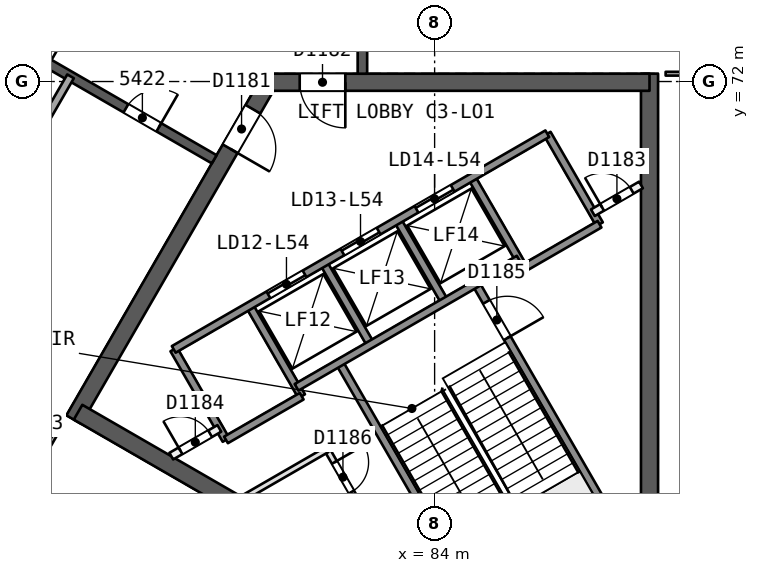
"""IFC4 building model, lengths in metres.
Left out: names, types, materials, properties, quantities, classifications, styles, units other than length and angle.
Written with IfcOpenShell. Run it as: python <this file> out.ifc"""

import sys

from ifc_helpers import new_model, si_unit, direction, frame, frame_2d, origin, place, context, subcontext, project, spatial, rectangle, extrude, element, fill, save


model = new_model("IFC4")
c1 = context("Model", 3, precision=1e-05, world=origin(), true_north=direction((0.0, 1.0)))
c2 = subcontext(c1, "Body", "Model", "MODEL_VIEW")
j1 = project(units=[si_unit("LENGTHUNIT", "METRE"), si_unit("PLANEANGLEUNIT", "RADIAN")], contexts=[c1])
p1 = place(None, origin())
s1 = spatial("IfcSite", under=j1, at=p1, CompositionType="ELEMENT")
p2 = place(p1, origin())
s2 = spatial("IfcBuilding", under=s1, at=p2, CompositionType="ELEMENT")
p3 = place(p2, frame((0.0, 0.0, 220.6)))
s3 = spatial("IfcBuildingStorey", under=s2, at=p3, CompositionType="ELEMENT", Elevation=220.6)
p4 = place(p3, frame((79.63, 71.981, 0.0), z_axis=(0.0, 0.0, 1.0), x_axis=(-0.500002171595, -0.86602415001, 0.0)))
e1 = element("IfcWall", 1, at=p4, inside=s3, PredefinedType="SHEAR", context=c2, shape_type="SweptSolid", body=[
    extrude(rectangle(XDim=10.25, YDim=0.45, at=frame_2d((5.125, 0.0))), origin(), (0.0, 0.0, 1.0), 3.7),
])
p5 = place(p4, frame((0.82, 0.0, 0.0)))
e2 = element("IfcOpeningElement", 2, at=p5, cuts=e1, PredefinedType="OPENING", context=c2, shape_type="SweptSolid", body=[
    extrude(rectangle(XDim=1.2, YDim=2.1, at=frame_2d((0.6, 1.05))), frame((0.0, 0.235, 0.0), z_axis=(0.0, -1.0, 0.0), x_axis=(1.0, 0.0, 0.0)), (0.0, 0.0, 1.0), 0.471),
])
p6 = place(p3, frame((74.617, 63.299, 0.0), z_axis=(0.0, 0.0, 1.0), x_axis=(0.86602594008, -0.499999071108, 0.0)))
e3 = element("IfcWall", 3, at=p6, inside=s3, PredefinedType="SHEAR", context=c2, shape_type="SweptSolid", body=[
    extrude(rectangle(XDim=14.108, YDim=0.45, at=frame_2d((7.054, 0.0))), origin(), (0.0, 0.0, 1.0), 3.7),
])
p7 = place(p3, frame((89.655, 58.002, 0.0), z_axis=(0.0, 0.0, 1.0), x_axis=(0.0, 1.0, 0.0)))
e4 = element("IfcWall", 4, at=p7, inside=s3, PredefinedType="SHEAR", context=c2, shape_type="SweptSolid", body=[
    extrude(rectangle(XDim=14.204, YDim=0.45, at=frame_2d((7.102, 0.0))), origin(), (0.0, 0.0, 1.0), 3.7),
])
p8 = place(p3, frame((89.655, 71.981, 0.0), z_axis=(0.0, 0.0, 1.0), x_axis=(-1.0, 0.0, 0.0)))
e5 = element("IfcWall", 5, at=p8, inside=s3, PredefinedType="SHEAR", context=c2, shape_type="SweptSolid", body=[
    extrude(rectangle(XDim=10.155, YDim=0.45, at=frame_2d((5.078, 0.0))), origin(), (0.0, 0.0, 1.0), 3.7),
])
p9 = place(p8, frame((8.005, 0.0, 0.0)))
e6 = element("IfcOpeningElement", 6, at=p9, cuts=e5, PredefinedType="OPENING", context=c2, shape_type="SweptSolid", body=[
    extrude(rectangle(XDim=1.2, YDim=2.1, at=frame_2d((0.6, 1.05))), frame((0.0, 0.235, 0.0), z_axis=(0.0, -1.0, 0.0), x_axis=(1.0, 0.0, 0.0)), (0.0, 0.0, 1.0), 0.471),
])
p10 = place(p3, frame((82.1, 72.206, 0.0), z_axis=(0.0, 0.0, 1.0), x_axis=(0.0, 1.0, 0.0)))
e7 = element("IfcWall", 7, at=p10, inside=s3, PredefinedType="SHEAR", context=c2, shape_type="SweptSolid", body=[
    extrude(rectangle(XDim=15.588, YDim=0.25, at=frame_2d((7.794, 0.0))), origin(), (0.0, 0.0, 1.0), 3.3),
])
p11 = place(p10, frame((2.15, 0.0, 0.0)))
e8 = element("IfcOpeningElement", 8, at=p11, cuts=e7, PredefinedType="OPENING", context=c2, shape_type="SweptSolid", body=[
    extrude(rectangle(XDim=1.0, YDim=2.1, at=frame_2d((0.5, 1.05))), frame((0.0, 0.135, 0.0), z_axis=(0.0, -1.0, 0.0), x_axis=(1.0, 0.0, 0.0)), (0.0, 0.0, 1.0), 0.271),
])
p12 = place(p10, frame((8.75, 0.0, 0.0)))
e9 = element("IfcOpeningElement", 9, at=p12, cuts=e7, PredefinedType="OPENING", context=c2, shape_type="SweptSolid", body=[
    extrude(rectangle(XDim=1.0, YDim=2.1, at=frame_2d((0.5, 1.05))), frame((0.0, 0.135, 0.0), z_axis=(0.0, -1.0, 0.0), x_axis=(1.0, 0.0, 0.0)), (0.0, 0.0, 1.0), 0.271),
])
p13 = place(p10, frame((12.594, 0.0, 0.0)))
e10 = element("IfcOpeningElement", 10, at=p13, cuts=e7, PredefinedType="OPENING", context=c2, shape_type="SweptSolid", body=[
    extrude(rectangle(XDim=1.0, YDim=2.1, at=frame_2d((0.5, 1.05))), frame((0.0, 0.135, 0.0), z_axis=(0.0, -1.0, 0.0), x_axis=(1.0, 0.0, 0.0)), (0.0, 0.0, 1.0), 0.271),
])
p14 = place(p3, frame((64.7, 77.748, 0.0), z_axis=(0.0, 0.0, 1.0), x_axis=(0.866026492143, -0.499998114903, 0.0)))
e11 = element("IfcWall", 11, at=p14, inside=s3, PredefinedType="SHEAR", context=c2, shape_type="SweptSolid", body=[
    extrude(rectangle(XDim=15.588, YDim=0.25, at=frame_2d((7.794, 0.0))), origin(), (0.0, 0.0, 1.0), 3.3),
])
p15 = place(p14, frame((2.462, 0.0, 0.0)))
e12 = element("IfcOpeningElement", 12, at=p15, cuts=e11, PredefinedType="OPENING", context=c2, shape_type="SweptSolid", body=[
    extrude(rectangle(XDim=1.0, YDim=2.1, at=frame_2d((0.5, 1.05))), frame((0.0, 0.135, 0.0), z_axis=(0.0, -1.0, 0.0), x_axis=(1.0, 0.0, 0.0)), (0.0, 0.0, 1.0), 0.271),
])
p16 = place(p14, frame((9.474, 0.0, 0.0)))
e13 = element("IfcOpeningElement", 13, at=p16, cuts=e11, PredefinedType="OPENING", context=c2, shape_type="SweptSolid", body=[
    extrude(rectangle(XDim=1.1, YDim=2.1, at=frame_2d((0.55, 1.05))), frame((0.0, 0.135, 0.0), z_axis=(0.0, -1.0, 0.0), x_axis=(1.0, 0.0, 0.0)), (0.0, 0.0, 1.0), 0.271),
])
p17 = place(p14, frame((12.906, 0.0, 0.0)))
e14 = element("IfcOpeningElement", 14, at=p17, cuts=e11, PredefinedType="OPENING", context=c2, shape_type="SweptSolid", body=[
    extrude(rectangle(XDim=1.0, YDim=2.1, at=frame_2d((0.5, 1.05))), frame((0.0, 0.135, 0.0), z_axis=(0.0, -1.0, 0.0), x_axis=(1.0, 0.0, 0.0)), (0.0, 0.0, 1.0), 0.271),
])
p18 = place(p3, frame((90.079, 72.206, 0.0), z_axis=(0.0, 0.0, 1.0), x_axis=(1.0, 0.0, 0.0)))
e15 = element("IfcWall", 15, at=p18, inside=s3, PredefinedType="PARTITIONING", context=c2, shape_type="SweptSolid", body=[
    extrude(rectangle(XDim=2.424, YDim=0.1, at=frame_2d((1.212, 0.0))), origin(), (0.0, 0.0, 1.0), 3.3),
])
p19 = place(p18, frame((0.762, 0.0, 0.0)))
e16 = element("IfcOpeningElement", 16, at=p19, cuts=e15, PredefinedType="OPENING", context=c2, shape_type="SweptSolid", body=[
    extrude(rectangle(XDim=0.9, YDim=2.1, at=frame_2d((0.45, 1.05))), frame((0.0, 0.061, 0.0), z_axis=(0.0, -1.0, 0.0), x_axis=(1.0, 0.0, 0.0)), (0.0, 0.0, 1.0), 0.121),
])
p20 = place(p3, frame((69.219, 63.127, 0.0), z_axis=(0.0, 0.0, 1.0), x_axis=(0.499993317952, 0.866029261632, 0.0)))
e17 = element("IfcWall", 17, at=p20, inside=s3, PredefinedType="PARTITIONING", context=c2, shape_type="SweptSolid", body=[
    extrude(rectangle(XDim=10.403, YDim=0.2, at=frame_2d((5.202, 0.0))), origin(), (0.0, 0.0, 1.0), 3.3),
])
p21 = place(p3, frame((72.999, 60.945, 0.0), z_axis=(0.0, 0.0, 1.0), x_axis=(0.49995203611, 0.866053093978, 0.0)))
e18 = element("IfcWall", 18, at=p21, inside=s3, PredefinedType="PARTITIONING", context=c2, shape_type="SweptSolid", body=[
    extrude(rectangle(XDim=2.424, YDim=0.1, at=frame_2d((1.212, 0.0))), origin(), (0.0, 0.0, 1.0), 3.3),
])
p22 = place(p21, frame((0.762, 0.0, 0.0)))
e19 = element("IfcOpeningElement", 19, at=p22, cuts=e18, PredefinedType="OPENING", context=c2, shape_type="SweptSolid", body=[
    extrude(rectangle(XDim=0.9, YDim=2.1, at=frame_2d((0.45, 1.05))), frame((0.0, 0.061, 0.0), z_axis=(0.0, -1.0, 0.0), x_axis=(1.0, 0.0, 0.0)), (0.0, 0.0, 1.0), 0.121),
])
p23 = place(p3, frame((88.155, 52.022, 0.0), z_axis=(0.0, 0.0, 1.0), x_axis=(-0.866024521231, 0.500001528624, 0.0)))
e20 = element("IfcWall", 20, at=p23, inside=s3, PredefinedType="SOLIDWALL", context=c2, shape_type="SweptSolid", body=[
    extrude(rectangle(XDim=50.762, YDim=0.3, at=frame_2d((25.381, 0.0))), origin(), (0.0, 0.0, 1.0), 3.3),
])
p24 = place(p23, frame((23.402, 0.0, 0.0)))
e21 = element("IfcOpeningElement", 21, at=p24, cuts=e20, PredefinedType="OPENING", context=c2, shape_type="SweptSolid", body=[
    extrude(rectangle(XDim=2.4, YDim=2.4, at=frame_2d((1.2, 1.2))), frame((0.0, 0.161, 0.0), z_axis=(0.0, -1.0, 0.0), x_axis=(1.0, 0.0, 0.0)), (0.0, 0.0, 1.0), 0.321),
])
p25 = place(p23, frame((29.013, 0.0, 0.0)))
e22 = element("IfcOpeningElement", 22, at=p25, cuts=e20, PredefinedType="OPENING", context=c2, shape_type="SweptSolid", body=[
    extrude(rectangle(XDim=2.4, YDim=2.4, at=frame_2d((1.2, 1.2))), frame((0.0, 0.161, 0.0), z_axis=(0.0, -1.0, 0.0), x_axis=(1.0, 0.0, 0.0)), (0.0, 0.0, 1.0), 0.321),
])
p26 = place(p23, frame((39.492, 0.0, 0.0)))
e23 = element("IfcOpeningElement", 23, at=p26, cuts=e20, PredefinedType="OPENING", context=c2, shape_type="SweptSolid", body=[
    extrude(rectangle(XDim=2.4, YDim=2.4, at=frame_2d((1.2, 1.2))), frame((0.0, 0.161, 0.0), z_axis=(0.0, -1.0, 0.0), x_axis=(1.0, 0.0, 0.0)), (0.0, 0.0, 1.0), 0.321),
])
p27 = place(p23, frame((18.569, 0.0, 0.0)))
e24 = element("IfcOpeningElement", 24, at=p27, cuts=e20, PredefinedType="OPENING", context=c2, shape_type="SweptSolid", body=[
    extrude(rectangle(XDim=2.4, YDim=2.4, at=frame_2d((1.2, 1.2))), frame((0.0, 0.161, 0.0), z_axis=(0.0, -1.0, 0.0), x_axis=(1.0, 0.0, 0.0)), (0.0, 0.0, 1.0), 0.321),
])
p28 = place(p23, frame((8.878, 0.0, 0.0)))
e25 = element("IfcOpeningElement", 25, at=p28, cuts=e20, PredefinedType="OPENING", context=c2, shape_type="SweptSolid", body=[
    extrude(rectangle(XDim=2.4, YDim=2.4, at=frame_2d((1.2, 1.2))), frame((0.0, 0.161, 0.0), z_axis=(0.0, -1.0, 0.0), x_axis=(1.0, 0.0, 0.0)), (0.0, 0.0, 1.0), 0.321),
])
p29 = place(p3, frame((77.135, 64.952, 0.0), z_axis=(0.0, 0.0, 1.0), x_axis=(0.499996545922, -0.866027397988, 0.0)))
e26 = element("IfcWall", 26, at=p29, inside=s3, PredefinedType="SOLIDWALL", context=c2, shape_type="SweptSolid", body=[
    extrude(rectangle(XDim=2.75, YDim=0.2, at=frame_2d((1.375, 0.0))), origin(), (0.0, 0.0, 1.0), 3.3),
])
p30 = place(p3, frame((81.169, 62.315, 0.0), z_axis=(0.0, 0.0, 1.0), x_axis=(0.499995408039, -0.866028054938, 0.0)))
e27 = element("IfcWall", 27, at=p30, inside=s3, PredefinedType="PARTITIONING", context=c2, shape_type="SweptSolid", body=[
    extrude(rectangle(XDim=1.6, YDim=0.15, at=frame_2d((0.8, 0.0))), origin(), (0.0, 0.0, 1.0), 3.3),
])
p31 = place(p30, frame((0.387, 0.0, 0.0)))
e28 = element("IfcOpeningElement", 28, at=p31, cuts=e27, PredefinedType="OPENING", context=c2, shape_type="SweptSolid", body=[
    extrude(rectangle(XDim=0.9, YDim=2.1, at=frame_2d((0.45, 1.05))), frame((0.0, 0.085, 0.0), z_axis=(0.0, -1.0, 0.0), x_axis=(1.0, 0.0, 0.0)), (0.0, 0.0, 1.0), 0.171),
])
p32 = place(p3, frame((79.127, 66.102, 0.0), z_axis=(0.0, 0.0, 1.0), x_axis=(0.499996545922, -0.866027397988, 0.0)))
e29 = element("IfcWall", 29, at=p32, inside=s3, PredefinedType="SOLIDWALL", context=c2, shape_type="SweptSolid", body=[
    extrude(rectangle(XDim=2.75, YDim=0.2, at=frame_2d((1.375, 0.0))), origin(), (0.0, 0.0, 1.0), 3.3),
])
p33 = place(p3, frame((81.493, 64.604, 0.0), z_axis=(0.0, 0.0, 1.0), x_axis=(0.500006057782, -0.866021906294, 0.0)))
e30 = element("IfcWall", 30, at=p33, inside=s3, PredefinedType="SOLIDWALL", context=c2, shape_type="SweptSolid", body=[
    extrude(rectangle(XDim=7.7, YDim=0.2, at=frame_2d((3.85, 0.0))), origin(), (0.0, 0.0, 1.0), 3.3),
])
for number, where, z_axis, x_axis in (
    (31, (81.076, 67.227, 0.0), (0.0, 0.0, 1.0), (0.5, -0.866, 0.0)),
    (32, (83.024, 68.352, 0.0), (0.0, 0.0, 1.0), (0.5, -0.866, 0.0)),
):
    element("IfcWall", number, at=place(p3, frame(where, z_axis=z_axis, x_axis=x_axis)), inside=s3, PredefinedType="SOLIDWALL", context=c2, shape_type="SweptSolid", body=[
        extrude(rectangle(XDim=2.48, YDim=0.2, at=frame_2d((1.24, 0.0))), origin(), (0.0, 0.0, 1.0), 3.3),
    ])
p34 = place(p3, frame((85.087, 66.679, 0.0), z_axis=(0.0, 0.0, 1.0), x_axis=(0.500019787375, -0.866013979237, 0.0)))
e33 = element("IfcWall", 33, at=p34, inside=s3, PredefinedType="SOLIDWALL", context=c2, shape_type="SweptSolid", body=[
    extrude(rectangle(XDim=7.7, YDim=0.2, at=frame_2d((3.85, 0.0))), origin(), (0.0, 0.0, 1.0), 3.3),
])
p35 = place(p34, frame((0.55, 0.0, 0.0)))
e34 = element("IfcOpeningElement", 34, at=p35, cuts=e33, PredefinedType="OPENING", context=c2, shape_type="SweptSolid", body=[
    extrude(rectangle(XDim=1.1, YDim=2.1, at=frame_2d((0.55, 1.05))), frame((0.0, 0.11, 0.0), z_axis=(0.0, -1.0, 0.0), x_axis=(1.0, 0.0, 0.0)), (0.0, 0.0, 1.0), 0.221),
])
for number, where, z_axis, x_axis in (
    (35, (84.973, 69.477, 0.0), (0.0, 0.0, 1.0), (0.5, -0.866, 0.0)),
    (36, (86.965, 70.626, 0.0), (0.0, 0.0, 1.0), (0.5, -0.866, 0.0)),
):
    element("IfcWall", number, at=place(p3, frame(where, z_axis=z_axis, x_axis=x_axis)), inside=s3, PredefinedType="SOLIDWALL", context=c2, shape_type="SweptSolid", body=[
        extrude(rectangle(XDim=2.75, YDim=0.2, at=frame_2d((1.375, 0.0))), origin(), (0.0, 0.0, 1.0), 3.3),
    ])
p36 = place(p3, frame((77.135, 64.952, 0.0), z_axis=(0.0, 0.0, 1.0), x_axis=(0.866031916153, 0.499988720078, 0.0)))
e37 = element("IfcWall", 37, at=p36, inside=s3, PredefinedType="SOLIDWALL", context=c2, shape_type="SweptSolid", body=[
    extrude(rectangle(XDim=11.35, YDim=0.2, at=frame_2d((5.675, 0.0))), origin(), (0.0, 0.0, 1.0), 3.3),
])
p37 = place(p36, frame((2.875, 0.0, 0.0)))
e38 = element("IfcOpeningElement", 38, at=p37, cuts=e37, PredefinedType="OPENING", context=c2, shape_type="SweptSolid", body=[
    extrude(rectangle(XDim=1.1, YDim=2.1, at=frame_2d((0.55, 1.05))), frame((0.0, 0.11, 0.0), z_axis=(0.0, -1.0, 0.0), x_axis=(1.0, 0.0, 0.0)), (0.0, 0.0, 1.0), 0.221),
])
p38 = place(p36, frame((5.125, 0.0, 0.0)))
e39 = element("IfcOpeningElement", 39, at=p38, cuts=e37, PredefinedType="OPENING", context=c2, shape_type="SweptSolid", body=[
    extrude(rectangle(XDim=1.1, YDim=2.1, at=frame_2d((0.55, 1.05))), frame((0.0, 0.11, 0.0), z_axis=(0.0, -1.0, 0.0), x_axis=(1.0, 0.0, 0.0)), (0.0, 0.0, 1.0), 0.221),
])
p39 = place(p36, frame((7.375, 0.0, 0.0)))
e40 = element("IfcOpeningElement", 40, at=p39, cuts=e37, PredefinedType="OPENING", context=c2, shape_type="SweptSolid", body=[
    extrude(rectangle(XDim=1.1, YDim=2.1, at=frame_2d((0.55, 1.05))), frame((0.0, 0.11, 0.0), z_axis=(0.0, -1.0, 0.0), x_axis=(1.0, 0.0, 0.0)), (0.0, 0.0, 1.0), 0.221),
])
p40 = place(p3, frame((77.07, 62.143, 0.0), z_axis=(0.0, 0.0, 1.0), x_axis=(0.866013036001, 0.500021421018, 0.0)))
e41 = element("IfcWall", 41, at=p40, inside=s3, PredefinedType="PARTITIONING", context=c2, shape_type="SweptSolid", body=[
    extrude(rectangle(XDim=1.461, YDim=0.2, at=frame_2d((0.73, 0.0))), origin(), (0.0, 0.0, 1.0), 3.3),
])
p41 = place(p40, frame((0.281, 0.0, 0.0)))
e42 = element("IfcOpeningElement", 42, at=p41, cuts=e41, PredefinedType="OPENING", context=c2, shape_type="SweptSolid", body=[
    extrude(rectangle(XDim=0.9, YDim=2.1, at=frame_2d((0.45, 1.05))), frame((0.0, 0.11, 0.0), z_axis=(0.0, -1.0, 0.0), x_axis=(1.0, 0.0, 0.0)), (0.0, 0.0, 1.0), 0.221),
])
p42 = place(p3, frame((88.165, 68.548, 0.0), z_axis=(0.0, 0.0, 1.0), x_axis=(0.866013036001, 0.500021421018, 0.0)))
e43 = element("IfcWall", 43, at=p42, inside=s3, PredefinedType="PARTITIONING", context=c2, shape_type="SweptSolid", body=[
    extrude(rectangle(XDim=1.461, YDim=0.2, at=frame_2d((0.73, 0.0))), origin(), (0.0, 0.0, 1.0), 3.3),
])
p43 = place(p42, frame((0.281, 0.0, 0.0)))
e44 = element("IfcOpeningElement", 44, at=p43, cuts=e43, PredefinedType="OPENING", context=c2, shape_type="SweptSolid", body=[
    extrude(rectangle(XDim=0.9, YDim=2.1, at=frame_2d((0.45, 1.05))), frame((0.0, 0.11, 0.0), z_axis=(0.0, -1.0, 0.0), x_axis=(1.0, 0.0, 0.0)), (0.0, 0.0, 1.0), 0.221),
])
p44 = place(p3, frame((80.367, 63.954, 0.0), z_axis=(0.0, 0.0, 1.0), x_axis=(0.866026575979, 0.499997969693, 0.0)))
e45 = element("IfcWall", 45, at=p44, inside=s3, PredefinedType="SOLIDWALL", context=c2, shape_type="SweptSolid", body=[
    extrude(rectangle(XDim=6.75, YDim=0.2, at=frame_2d((3.375, 0.0))), origin(), (0.0, 0.0, 1.0), 3.3),
])
p45 = place(p3, frame((78.51, 62.57, 0.0), z_axis=(0.0, 0.0, 1.0), x_axis=(0.866053019151, 0.499952165731, 0.0)))
e46 = element("IfcWall", 46, at=p45, inside=s3, PredefinedType="SOLIDWALL", context=c2, shape_type="SweptSolid", body=[
    extrude(rectangle(XDim=2.3, YDim=0.2, at=frame_2d((1.15, 0.0))), origin(), (0.0, 0.0, 1.0), 3.3),
])
p46 = place(p3, frame((86.348, 67.095, 0.0), z_axis=(0.0, 0.0, 1.0), x_axis=(0.86602648383, 0.499998129301, 0.0)))
e47 = element("IfcWall", 47, at=p46, inside=s3, PredefinedType="SOLIDWALL", context=c2, shape_type="SweptSolid", body=[
    extrude(rectangle(XDim=2.3, YDim=0.2, at=frame_2d((1.15, 0.0))), origin(), (0.0, 0.0, 1.0), 3.3),
])
p47 = place(p3, frame((78.97, 61.046, 0.0), z_axis=(0.0, 0.0, 1.0), x_axis=(0.866033475577, 0.499986018985, 0.0)))
e48 = element("IfcWall", 48, at=p47, inside=s3, PredefinedType="PARTITIONING", context=c2, shape_type="SweptSolid", body=[
    extrude(rectangle(XDim=2.539, YDim=0.15, at=frame_2d((1.27, 0.0))), origin(), (0.0, 0.0, 1.0), 3.3),
])
p48 = place(p17, origin())
e49 = element("IfcDoor", 49, at=p48, inside=s3, OperationType="SINGLE_SWING_RIGHT", PredefinedType="NOTDEFINED", context=c2, shape_type="SweptSolid", body=[
    extrude(rectangle(XDim=1.0, YDim=2.1, at=frame_2d((0.5, 1.05))), frame((0.0, 0.025, 0.0), z_axis=(0.0, -1.0, 0.0), x_axis=(1.0, 0.0, 0.0)), (0.0, 0.0, 1.0), 0.05),
])
fill(e14, e49)
p49 = place(p5, origin())
e50 = element("IfcDoor", 50, at=p49, inside=s3, OperationType="SINGLE_SWING_RIGHT", PredefinedType="NOTDEFINED", context=c2, shape_type="SweptSolid", body=[
    extrude(rectangle(XDim=1.2, YDim=2.1, at=frame_2d((0.6, 1.05))), frame((0.0, 0.025, 0.0), z_axis=(0.0, -1.0, 0.0), x_axis=(1.0, 0.0, 0.0)), (0.0, 0.0, 1.0), 0.05),
])
fill(e2, e50)
p50 = place(p9, origin())
e51 = element("IfcDoor", 51, at=p50, inside=s3, OperationType="SINGLE_SWING_LEFT", PredefinedType="NOTDEFINED", context=c2, shape_type="SweptSolid", body=[
    extrude(rectangle(XDim=1.2, YDim=2.1, at=frame_2d((0.6, 1.05))), frame((0.0, 0.025, 0.0), z_axis=(0.0, -1.0, 0.0), x_axis=(1.0, 0.0, 0.0)), (0.0, 0.0, 1.0), 0.05),
])
fill(e6, e51)
p51 = place(p37, origin())
e52 = element("IfcDoor", 52, at=p51, inside=s3, OperationType="SLIDING_TO_LEFT", PredefinedType="NOTDEFINED", context=c2, shape_type="SweptSolid", body=[
    extrude(rectangle(XDim=1.1, YDim=2.1, at=frame_2d((0.55, 1.05))), frame((0.0, 0.025, 0.0), z_axis=(0.0, -1.0, 0.0), x_axis=(1.0, 0.0, 0.0)), (0.0, 0.0, 1.0), 0.05),
])
fill(e38, e52)
p52 = place(p38, origin())
e53 = element("IfcDoor", 53, at=p52, inside=s3, OperationType="SLIDING_TO_RIGHT", PredefinedType="NOTDEFINED", context=c2, shape_type="SweptSolid", body=[
    extrude(rectangle(XDim=1.1, YDim=2.1, at=frame_2d((0.55, 1.05))), frame((0.0, 0.025, 0.0), z_axis=(0.0, -1.0, 0.0), x_axis=(1.0, 0.0, 0.0)), (0.0, 0.0, 1.0), 0.05),
])
fill(e39, e53)
p53 = place(p39, origin())
e54 = element("IfcDoor", 54, at=p53, inside=s3, OperationType="SLIDING_TO_LEFT", PredefinedType="NOTDEFINED", context=c2, shape_type="SweptSolid", body=[
    extrude(rectangle(XDim=1.1, YDim=2.1, at=frame_2d((0.55, 1.05))), frame((0.0, 0.025, 0.0), z_axis=(0.0, -1.0, 0.0), x_axis=(1.0, 0.0, 0.0)), (0.0, 0.0, 1.0), 0.05),
])
fill(e40, e54)
p54 = place(p43, origin())
e55 = element("IfcDoor", 55, at=p54, inside=s3, OperationType="SINGLE_SWING_LEFT", PredefinedType="NOTDEFINED", context=c2, shape_type="SweptSolid", body=[
    extrude(rectangle(XDim=0.9, YDim=2.1, at=frame_2d((0.45, 1.05))), frame((0.0, 0.025, 0.0), z_axis=(0.0, -1.0, 0.0), x_axis=(1.0, 0.0, 0.0)), (0.0, 0.0, 1.0), 0.05),
])
fill(e44, e55)
p55 = place(p41, origin())
e56 = element("IfcDoor", 56, at=p55, inside=s3, OperationType="SINGLE_SWING_LEFT", PredefinedType="NOTDEFINED", context=c2, shape_type="SweptSolid", body=[
    extrude(rectangle(XDim=0.9, YDim=2.1, at=frame_2d((0.45, 1.05))), frame((0.0, 0.025, 0.0), z_axis=(0.0, -1.0, 0.0), x_axis=(1.0, 0.0, 0.0)), (0.0, 0.0, 1.0), 0.05),
])
fill(e42, e56)
p56 = place(p35, origin())
e57 = element("IfcDoor", 57, at=p56, inside=s3, OperationType="SINGLE_SWING_RIGHT", PredefinedType="NOTDEFINED", context=c2, shape_type="SweptSolid", body=[
    extrude(rectangle(XDim=1.1, YDim=2.1, at=frame_2d((0.55, 1.05))), frame((0.0, 0.025, 0.0), z_axis=(0.0, -1.0, 0.0), x_axis=(1.0, 0.0, 0.0)), (0.0, 0.0, 1.0), 0.05),
])
fill(e34, e57)
p57 = place(p31, origin())
e58 = element("IfcDoor", 58, at=p57, inside=s3, OperationType="SINGLE_SWING_LEFT", PredefinedType="NOTDEFINED", context=c2, shape_type="SweptSolid", body=[
    extrude(rectangle(XDim=0.9, YDim=2.1, at=frame_2d((0.45, 1.05))), frame((0.0, 0.025, 0.0), z_axis=(0.0, -1.0, 0.0), x_axis=(1.0, 0.0, 0.0)), (0.0, 0.0, 1.0), 0.05),
])
fill(e28, e58)
save(model, sys.argv[1])
